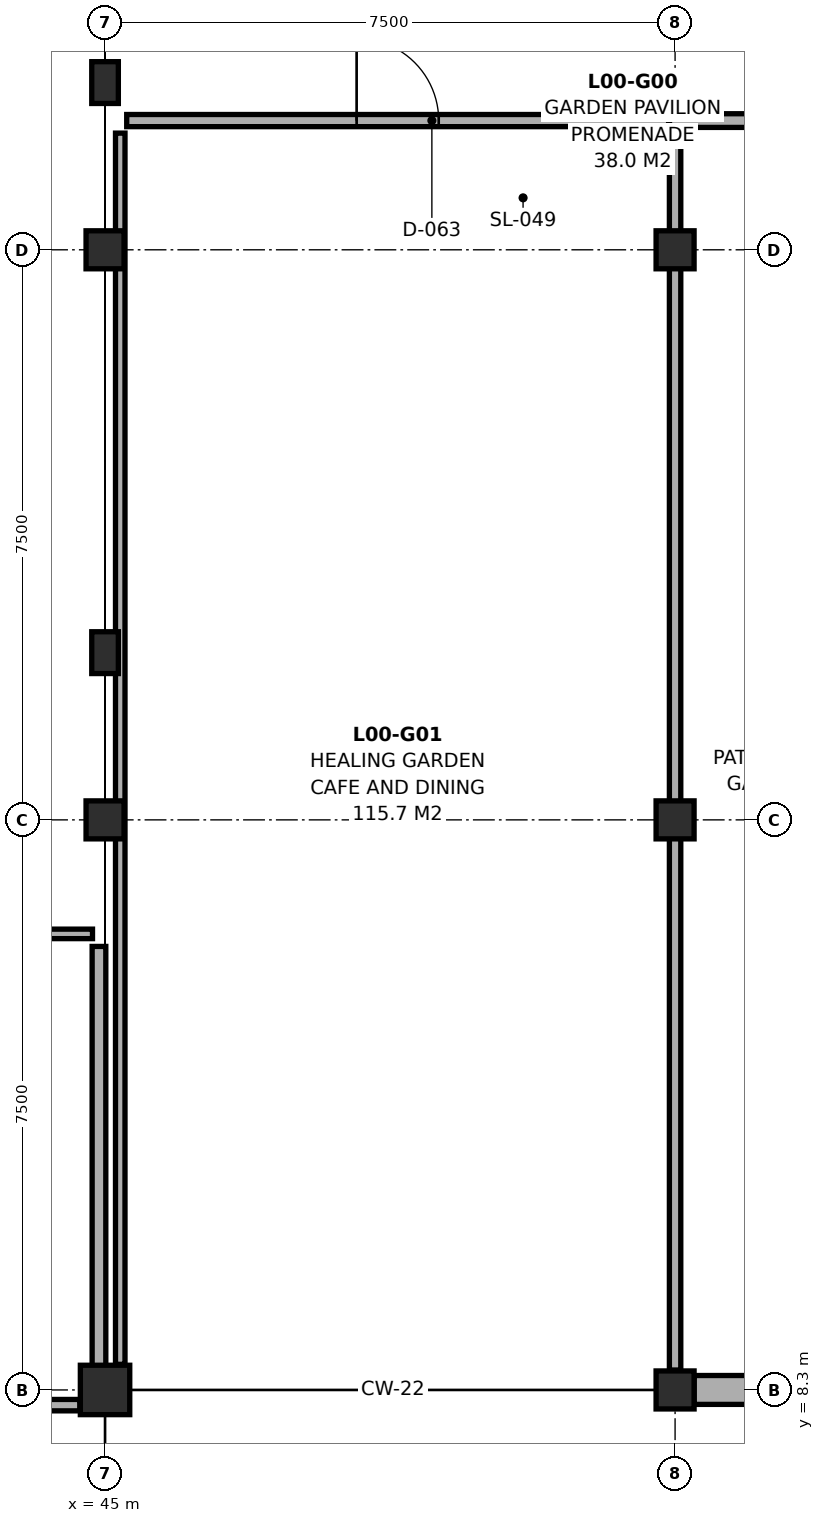
"""IFC4 building model, lengths in metres.
Left out: names, types, materials, properties, quantities, classifications, styles, units other than length and angle.
Written with IfcOpenShell. Run it as: python <this file> out.ifc"""

import sys

from ifc_helpers import new_model, si_unit, direction, frame, frame_2d, origin, origin_2d, place, context, subcontext, project, spatial, rectangle, extrude, element, fill, save


model = new_model("IFC4")
c1 = context("Model", 3, precision=1e-05, world=origin(), true_north=direction((0.0, 1.0)))
c2 = subcontext(c1, "Body", "Model", "MODEL_VIEW")
j1 = project(units=[si_unit("LENGTHUNIT", "METRE"), si_unit("PLANEANGLEUNIT", "RADIAN")], contexts=[c1])
p1 = place(None, origin())
s1 = spatial("IfcSite", under=j1, at=p1, CompositionType="ELEMENT")
p2 = place(p1, origin())
s2 = spatial("IfcBuilding", under=s1, at=p2, CompositionType="ELEMENT")
p3 = place(p2, origin())
s3 = spatial("IfcBuildingStorey", under=s2, at=p3, CompositionType="ELEMENT", Elevation=0.0)
p4 = place(p3, frame((45.0, 8.3, 0.0), z_axis=(0.0, 0.0, 1.0), x_axis=(1.0, 0.0, 0.0)))
e1 = element("IfcColumn", 1, at=p4, inside=s3, PredefinedType="COLUMN", context=c2, shape_type="SweptSolid", body=[
    extrude(rectangle(XDim=0.65, YDim=0.65, at=origin_2d()), origin(), (0.0, 0.0, 1.0), 4.7),
])
for number, where, z_axis, x_axis in (
    (2, (45.0, 15.8, 0.0), (0.0, 0.0, 1.0), (1.0, 0.0, 0.0)),
    (3, (45.0, 23.3, 0.0), (0.0, 0.0, 1.0), (1.0, 0.0, 0.0)),
):
    element("IfcColumn", number, at=place(p3, frame(where, z_axis=z_axis, x_axis=x_axis)), inside=s3, PredefinedType="COLUMN", context=c2, shape_type="SweptSolid", body=[
        extrude(rectangle(XDim=0.5, YDim=0.5, at=origin_2d()), origin(), (0.0, 0.0, 1.0), 6.138),
    ])
for number, where, z_axis, x_axis in (
    (4, (52.5, 8.3, 0.0), (0.0, 0.0, 1.0), (1.0, 0.0, 0.0)),
    (5, (52.5, 15.8, 0.0), (0.0, 0.0, 1.0), (1.0, 0.0, 0.0)),
    (6, (52.5, 23.3, 0.0), (0.0, 0.0, 1.0), (1.0, 0.0, 0.0)),
):
    element("IfcColumn", number, at=place(p3, frame(where, z_axis=z_axis, x_axis=x_axis)), inside=s3, PredefinedType="COLUMN", context=c2, shape_type="SweptSolid", body=[
        extrude(rectangle(XDim=0.5, YDim=0.5, at=origin_2d()), origin(), (0.0, 0.0, 1.0), 5.036),
    ])
for number, where, z_axis, x_axis in (
    (7, (45.0, 18.0, 0.0), (0.0, 0.0, 1.0), (1.0, 0.0, 0.0)),
    (8, (45.0, 25.5, 0.0), (0.0, 0.0, 1.0), (1.0, 0.0, 0.0)),
):
    element("IfcColumn", number, at=place(p3, frame(where, z_axis=z_axis, x_axis=x_axis)), inside=s3, PredefinedType="PILASTER", context=c2, shape_type="SweptSolid", body=[
        extrude(rectangle(XDim=0.35, YDim=0.55, at=origin_2d()), origin(), (0.0, 0.0, 1.0), 4.7),
    ])
p5 = place(p3, frame((59.75, 8.3, 0.0), z_axis=(0.0, 0.0, 1.0), x_axis=(-1.0, 0.0, 0.0)))
e9 = element("IfcWall", 9, at=p5, inside=s3, PredefinedType="SOLIDWALL", context=c2, shape_type="SweptSolid", body=[
    extrude(rectangle(XDim=7.0, YDim=0.38, at=frame_2d((3.5, 0.0))), origin(), (0.0, 0.0, 1.0), 4.321),
])
p6 = place(p3, frame((30.387, 8.1, 0.0), z_axis=(0.0, 0.0, 1.0), x_axis=(1.0, 0.0, 0.0)))
e10 = element("IfcWall", 10, at=p6, inside=s3, PredefinedType="PARTITIONING", context=c2, shape_type="SweptSolid", body=[
    extrude(rectangle(XDim=14.281, YDim=0.15, at=frame_2d((7.141, 0.0))), origin(), (0.0, 0.0, 1.0), 3.985),
])
p7 = place(p6, frame((7.887, 0.0, 0.0)))
e11 = element("IfcOpeningElement", 11, at=p7, cuts=e10, PredefinedType="OPENING", context=c2, shape_type="SweptSolid", body=[
    extrude(rectangle(XDim=1.56, YDim=2.3, at=frame_2d((0.78, 1.15))), frame((0.0, 0.087, 0.0), z_axis=(0.0, -1.0, 0.0), x_axis=(1.0, 0.0, 0.0)), (0.0, 0.0, 1.0), 0.174),
])
p8 = place(p3, frame((45.285, 25.0, 0.0), z_axis=(0.0, 0.0, 1.0), x_axis=(1.0, 0.0, 0.0)))
e12 = element("IfcWall", 12, at=p8, inside=s3, PredefinedType="PARTITIONING", context=c2, shape_type="SweptSolid", body=[
    extrude(rectangle(XDim=7.13, YDim=0.16, at=frame_2d((3.565, 0.0))), origin(), (0.0, 0.0, 1.0), 4.321),
])
p9 = place(p8, frame((3.025, 0.0, 0.0)))
e13 = element("IfcOpeningElement", 13, at=p9, cuts=e12, PredefinedType="OPENING", context=c2, shape_type="SweptSolid", body=[
    extrude(rectangle(XDim=1.08, YDim=2.18, at=frame_2d((0.54, 1.09))), frame((0.0, 0.092, 0.0), z_axis=(0.0, -1.0, 0.0), x_axis=(1.0, 0.0, 0.0)), (0.0, 0.0, 1.0), 0.184),
])
p10 = place(p3, frame((52.427, 25.0, 0.0), z_axis=(0.0, 0.0, 1.0), x_axis=(1.0, 0.0, 0.0)))
e14 = element("IfcWall", 14, at=p10, inside=s3, PredefinedType="PARTITIONING", context=c2, shape_type="SweptSolid", body=[
    extrude(rectangle(XDim=7.471, YDim=0.18, at=frame_2d((3.735, 0.0))), origin(), (0.0, 0.0, 1.0), 4.321),
])
p11 = place(p10, frame((3.176, 0.0, 0.0)))
e15 = element("IfcOpeningElement", 15, at=p11, cuts=e14, PredefinedType="OPENING", context=c2, shape_type="SweptSolid", body=[
    extrude(rectangle(XDim=1.12, YDim=2.2, at=frame_2d((0.56, 1.1))), frame((0.0, 0.102, 0.0), z_axis=(0.0, -1.0, 0.0), x_axis=(1.0, 0.0, 0.0)), (0.0, 0.0, 1.0), 0.204),
])
p12 = place(p3, frame((30.087, 14.3, 0.0), z_axis=(0.0, 0.0, 1.0), x_axis=(1.0, 0.0, 0.0)))
e16 = element("IfcWall", 16, at=p12, inside=s3, PredefinedType="PARTITIONING", context=c2, shape_type="SweptSolid", body=[
    extrude(rectangle(XDim=14.748, YDim=0.125, at=frame_2d((7.374, 0.0))), origin(), (0.0, 0.0, 1.0), 3.985),
])
p13 = place(p3, frame((44.92, 8.432, 0.0), z_axis=(0.0, 0.0, 1.0), x_axis=(0.0, 1.0, 0.0)))
e17 = element("IfcWall", 17, at=p13, inside=s3, PredefinedType="PARTITIONING", context=c2, shape_type="SweptSolid", body=[
    extrude(rectangle(XDim=5.703, YDim=0.18, at=frame_2d((2.852, 0.0))), origin(), (0.0, 0.0, 1.0), 3.985),
])
p14 = place(p3, frame((45.2, 8.637, 0.0), z_axis=(0.0, 0.0, 1.0), x_axis=(0.0, 1.0, 0.0)))
e18 = element("IfcWall", 18, at=p14, inside=s3, PredefinedType="PARTITIONING", context=c2, shape_type="SweptSolid", body=[
    extrude(rectangle(XDim=16.198, YDim=0.125, at=frame_2d((8.099, 0.0))), origin(), (0.0, 0.0, 1.0), 3.985),
])
p15 = place(p3, frame((52.5, 8.562, 0.0), z_axis=(0.0, 0.0, 1.0), x_axis=(0.0, 1.0, 0.0)))
e19 = element("IfcWall", 19, at=p15, inside=s3, PredefinedType="PARTITIONING", context=c2, shape_type="SweptSolid", body=[
    extrude(rectangle(XDim=16.336, YDim=0.15, at=frame_2d((8.168, 0.0))), origin(), (0.0, 0.0, 1.0), 4.315),
])
p16 = place(p9, origin())
e20 = element("IfcDoor", 20, at=p16, inside=s3, OperationType="SINGLE_SWING_LEFT", PredefinedType="DOOR", context=c2, shape_type="SweptSolid", body=[
    extrude(rectangle(XDim=1.08, YDim=2.18, at=frame_2d((0.54, 1.09))), frame((0.0, 0.025, 0.0), z_axis=(0.0, -1.0, 0.0), x_axis=(1.0, 0.0, 0.0)), (0.0, 0.0, 1.0), 0.05),
])
fill(e13, e20)
save(model, sys.argv[1])
